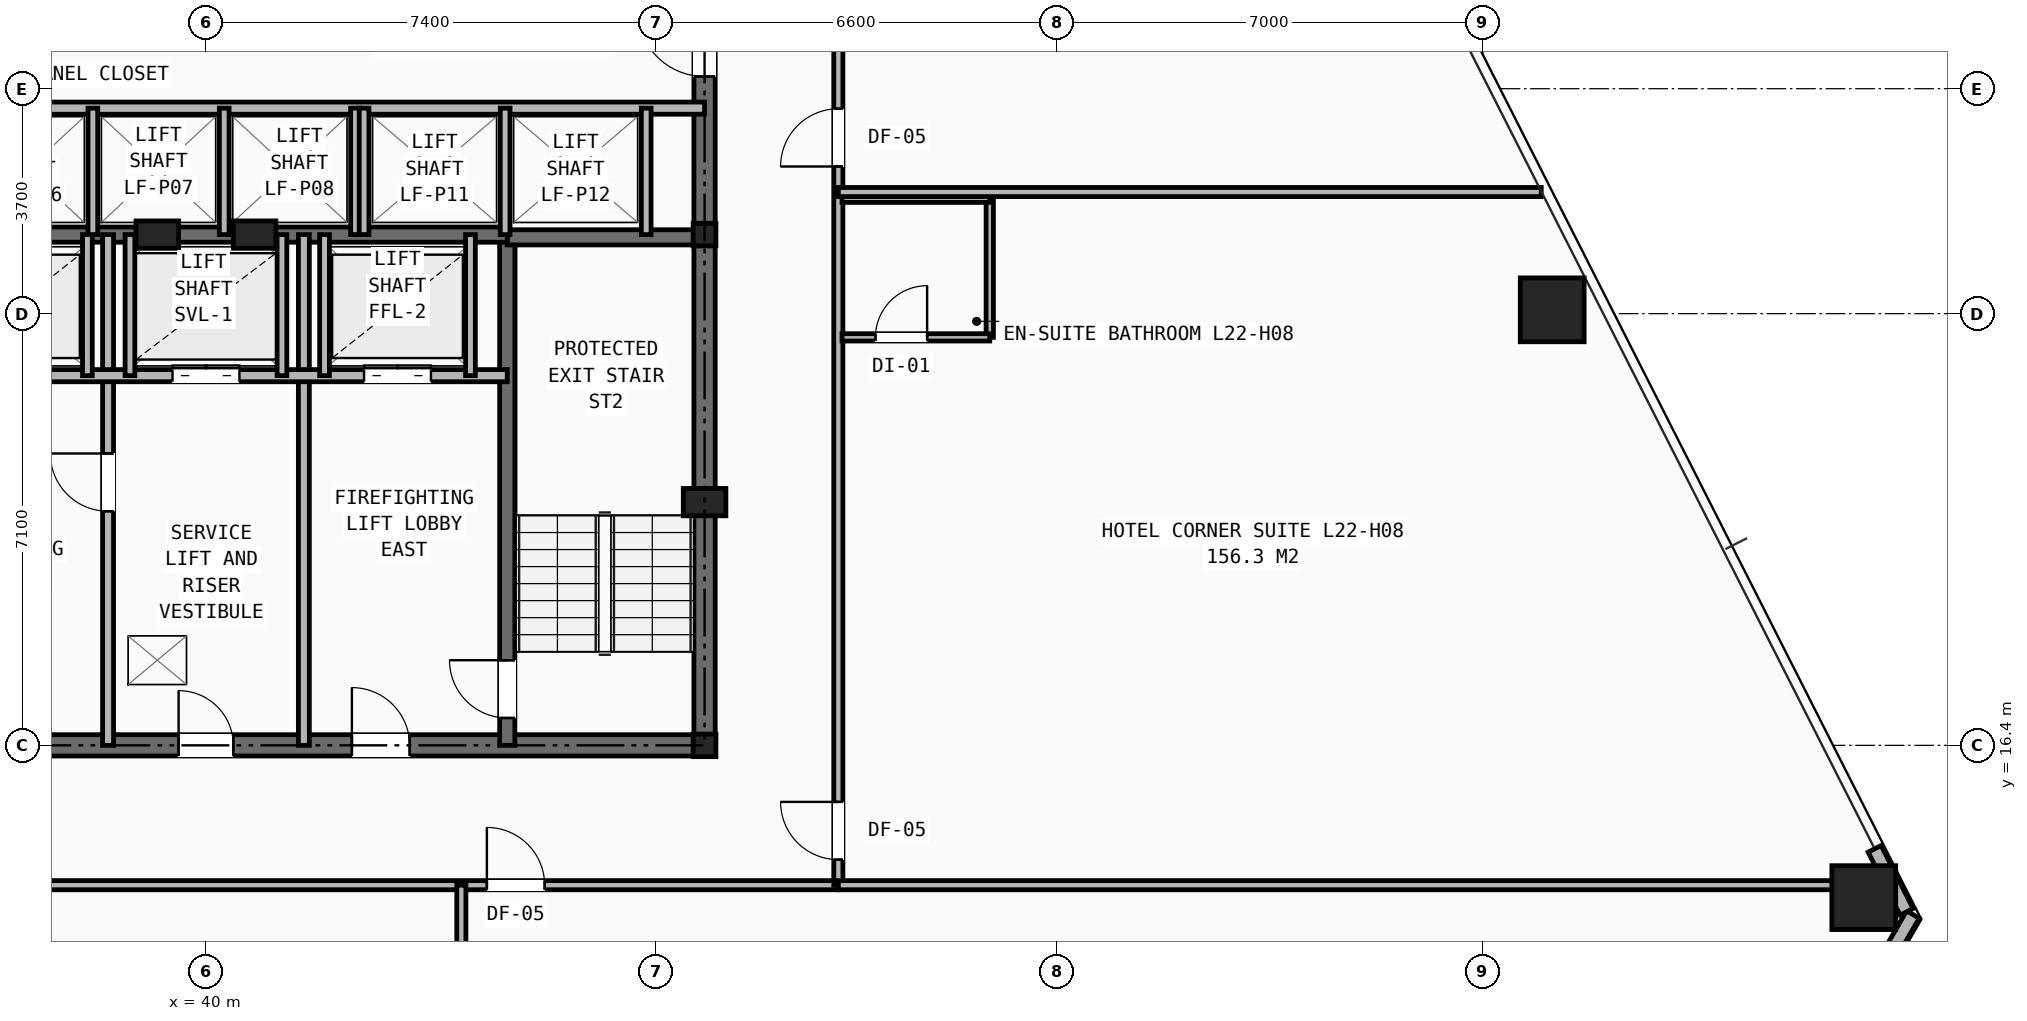
"""IFC4 building model, lengths in metres.
Left out: names, types, materials, properties, quantities, classifications, styles, units other than length and angle.
Written with IfcOpenShell. Run it as: python <this file> out.ifc"""

import sys

from ifc_helpers import new_model, si_unit, direction, frame, frame_2d, origin, origin_2d, place, context, subcontext, project, spatial, rectangle, hollow_rectangle, i_section, extrude, element, fill, save


model = new_model("IFC4")
c1 = context("Model", 3, precision=1e-05, world=origin(), true_north=direction((0.0, 1.0)))
c2 = subcontext(c1, "Body", "Model", "MODEL_VIEW")
j1 = project(units=[si_unit("LENGTHUNIT", "METRE"), si_unit("PLANEANGLEUNIT", "RADIAN")], contexts=[c1])
p1 = place(None, origin())
s1 = spatial("IfcSite", under=j1, at=p1, CompositionType="ELEMENT")
p2 = place(p1, origin())
s2 = spatial("IfcBuilding", under=s1, at=p2, CompositionType="ELEMENT")
p3 = place(p2, frame((0.0, 0.0, 79.8)))
s3 = spatial("IfcBuildingStorey", under=s2, at=p3, CompositionType="ELEMENT", Elevation=79.8)
for number, where, z_axis, x_axis in (
    (1, (48.2, 16.4, 0.0), (0.0, 0.0, 1.0), (1.0, 0.0, 0.0)),
    (2, (48.2, 24.8, 0.0), (0.0, 0.0, 1.0), (1.0, 0.0, 0.0)),
):
    element("IfcColumn", number, at=place(p3, frame(where, z_axis=z_axis, x_axis=x_axis)), inside=s3, PredefinedType="COLUMN", context=c2, shape_type="SweptSolid", body=[
        extrude(i_section(OverallWidth=0.374, OverallDepth=0.372, WebThickness=0.016, FlangeThickness=0.026, at=origin_2d()), origin(), (0.0, 0.0, 1.0), 3.2),
    ])
for number, where, z_axis, x_axis in (
    (3, (48.2, 20.4, 0.0), (0.0, 0.0, 1.0), (1.0, 0.0, 0.0)),
    (4, (39.2, 24.8, 0.0), (0.0, 0.0, 1.0), (1.0, 0.0, 0.0)),
    (5, (40.8, 24.8, 0.0), (0.0, 0.0, 1.0), (1.0, 0.0, 0.0)),
):
    element("IfcColumn", number, at=place(p3, frame(where, z_axis=z_axis, x_axis=x_axis)), inside=s3, PredefinedType="PILASTER", context=c2, shape_type="SweptSolid", body=[
        extrude(rectangle(XDim=0.7, YDim=0.45, at=origin_2d()), origin(), (0.0, 0.0, 1.0), 3.2),
    ])
for number, where, z_axis, x_axis in (
    (6, (67.264, 13.896, 0.0), (0.0, 0.0, 1.0), (1.0, 0.0, 0.0)),
    (7, (62.14, 23.563, 0.0), (0.0, 0.0, 1.0), (1.0, 0.0, 0.0)),
):
    element("IfcColumn", number, at=place(p3, frame(where, z_axis=z_axis, x_axis=x_axis)), inside=s3, PredefinedType="COLUMN", context=c2, shape_type="SweptSolid", body=[
        extrude(hollow_rectangle(XDim=1.05, YDim=1.05, WallThickness=0.07, at=origin_2d()), origin(), (0.0, 0.0, 1.0), 3.2),
    ])
p4 = place(p3, frame((68.072, 13.618, 0.0), z_axis=(0.0, 0.0, 1.0), x_axis=(-0.499984915177, -0.866034112836, 0.0)))
e8 = element("IfcWall", 8, at=p4, inside=s3, PredefinedType="SHEAR", context=c2, shape_type="SweptSolid", body=[
    extrude(rectangle(XDim=9.743, YDim=0.24, at=frame_2d((4.872, 0.0))), origin(), (0.0, 0.0, 1.0), 2.253),
])
p5 = place(p3, frame((67.969, 13.661, 0.0), z_axis=(0.0, 0.0, 1.0), x_axis=(-0.452163091908, 0.891935276977, 0.0)))
e9 = element("IfcWall", 9, at=p5, inside=s3, PredefinedType="SHEAR", context=c2, shape_type="SweptSolid", body=[
    extrude(rectangle(XDim=1.163, YDim=0.24, at=frame_2d((0.581, 0.0))), origin(), (0.0, 0.0, 1.0), 2.253),
])
p6 = place(p3, frame((31.8, 16.4, 0.0), z_axis=(0.0, 0.0, 1.0), x_axis=(1.0, 0.0, 0.0)))
e10 = element("IfcWall", 10, at=p6, inside=s3, PredefinedType="SHEAR", context=c2, shape_type="SweptSolid", body=[
    extrude(rectangle(XDim=16.4, YDim=0.35, at=frame_2d((8.2, 0.0))), origin(), (0.0, 0.0, 1.0), 2.97),
])
p7 = place(p6, frame((7.75, 0.0, 0.0)))
e11 = element("IfcOpeningElement", 11, at=p7, cuts=e10, PredefinedType="OPENING", context=c2, shape_type="SweptSolid", body=[
    extrude(rectangle(XDim=0.9, YDim=2.1, at=frame_2d((0.45, 1.05))), frame((0.0, 0.185, 0.0), z_axis=(0.0, -1.0, 0.0), x_axis=(1.0, 0.0, 0.0)), (0.0, 0.0, 1.0), 0.37),
])
p8 = place(p6, frame((4.2, 0.0, 0.0)))
e12 = element("IfcOpeningElement", 12, at=p8, cuts=e10, PredefinedType="OPENING", context=c2, shape_type="SweptSolid", body=[
    extrude(rectangle(XDim=0.95, YDim=2.1, at=frame_2d((0.475, 1.05))), frame((0.0, 0.185, 0.0), z_axis=(0.0, -1.0, 0.0), x_axis=(1.0, 0.0, 0.0)), (0.0, 0.0, 1.0), 0.37),
])
p9 = place(p6, frame((10.6, 0.0, 0.0)))
e13 = element("IfcOpeningElement", 13, at=p9, cuts=e10, PredefinedType="OPENING", context=c2, shape_type="SweptSolid", body=[
    extrude(rectangle(XDim=0.95, YDim=2.1, at=frame_2d((0.475, 1.05))), frame((0.0, 0.185, 0.0), z_axis=(0.0, -1.0, 0.0), x_axis=(1.0, 0.0, 0.0)), (0.0, 0.0, 1.0), 0.37),
])
p10 = place(p3, frame((48.2, 16.4, 0.0), z_axis=(0.0, 0.0, 1.0), x_axis=(0.0, 1.0, 0.0)))
e14 = element("IfcWall", 14, at=p10, inside=s3, PredefinedType="SHEAR", context=c2, shape_type="SweptSolid", body=[
    extrude(rectangle(XDim=14.8, YDim=0.35, at=frame_2d((7.4, 0.0))), origin(), (0.0, 0.0, 1.0), 2.97),
])
p11 = place(p10, frame((11.0, 0.0, 0.0)))
e15 = element("IfcOpeningElement", 15, at=p11, cuts=e14, PredefinedType="OPENING", context=c2, shape_type="SweptSolid", body=[
    extrude(rectangle(XDim=1.1, YDim=2.15, at=frame_2d((0.55, 1.075))), frame((0.0, 0.185, 0.0), z_axis=(0.0, -1.0, 0.0), x_axis=(1.0, 0.0, 0.0)), (0.0, 0.0, 1.0), 0.37),
])
p12 = place(p3, frame((44.955, 16.4, 0.0), z_axis=(0.0, 0.0, 1.0), x_axis=(0.0, 1.0, 0.0)))
e16 = element("IfcWall", 16, at=p12, inside=s3, PredefinedType="SHEAR", context=c2, shape_type="SweptSolid", body=[
    extrude(rectangle(XDim=8.4, YDim=0.25, at=frame_2d((4.2, 0.0))), origin(), (0.0, 0.0, 1.0), 2.97),
])
p13 = place(p12, frame((0.45, 0.0, 0.0)))
e17 = element("IfcOpeningElement", 17, at=p13, cuts=e16, PredefinedType="OPENING", context=c2, shape_type="SweptSolid", body=[
    extrude(rectangle(XDim=0.95, YDim=2.1, at=frame_2d((0.475, 1.05))), frame((0.0, 0.135, 0.0), z_axis=(0.0, -1.0, 0.0), x_axis=(1.0, 0.0, 0.0)), (0.0, 0.0, 1.0), 0.27),
])
p14 = place(p3, frame((44.955, 24.755, 0.0), z_axis=(0.0, 0.0, 1.0), x_axis=(1.0, 0.0, 0.0)))
e18 = element("IfcWall", 18, at=p14, inside=s3, PredefinedType="SHEAR", context=c2, shape_type="SweptSolid", body=[
    extrude(rectangle(XDim=3.245, YDim=0.25, at=frame_2d((1.623, 0.0))), origin(), (0.0, 0.0, 1.0), 2.97),
])
p15 = place(p3, frame((35.045, 24.8, 0.0), z_axis=(0.0, 0.0, 1.0), x_axis=(1.0, 0.0, 0.0)))
e19 = element("IfcWall", 19, at=p15, inside=s3, PredefinedType="SHEAR", context=c2, shape_type="SweptSolid", body=[
    extrude(rectangle(XDim=9.91, YDim=0.25, at=frame_2d((4.955, 0.0))), origin(), (0.0, 0.0, 1.0), 2.97),
])
p16 = place(p3, frame((38.39, 16.4, 0.0), z_axis=(0.0, 0.0, 1.0), x_axis=(0.0, 1.0, 0.0)))
e20 = element("IfcWall", 20, at=p16, inside=s3, PredefinedType="PARTITIONING", context=c2, shape_type="SweptSolid", body=[
    extrude(rectangle(XDim=8.4, YDim=0.18, at=frame_2d((4.2, 0.0))), origin(), (0.0, 0.0, 1.0), 2.421),
])
p17 = place(p16, frame((3.85, 0.0, 0.0)))
e21 = element("IfcOpeningElement", 21, at=p17, cuts=e20, PredefinedType="OPENING", context=c2, shape_type="SweptSolid", body=[
    extrude(rectangle(XDim=0.95, YDim=2.1, at=frame_2d((0.475, 1.05))), frame((0.0, 0.1, 0.0), z_axis=(0.0, -1.0, 0.0), x_axis=(1.0, 0.0, 0.0)), (0.0, 0.0, 1.0), 0.2),
])
p18 = place(p3, frame((41.61, 16.4, 0.0), z_axis=(0.0, 0.0, 1.0), x_axis=(0.0, 1.0, 0.0)))
e22 = element("IfcWall", 22, at=p18, inside=s3, PredefinedType="PARTITIONING", context=c2, shape_type="SweptSolid", body=[
    extrude(rectangle(XDim=8.4, YDim=0.18, at=frame_2d((4.2, 0.0))), origin(), (0.0, 0.0, 1.0), 2.421),
])
p19 = place(p3, frame((35.045, 22.48, 0.0), z_axis=(0.0, 0.0, 1.0), x_axis=(1.0, 0.0, 0.0)))
e23 = element("IfcWall", 23, at=p19, inside=s3, PredefinedType="SOLIDWALL", context=c2, shape_type="SweptSolid", body=[
    extrude(rectangle(XDim=9.91, YDim=0.2, at=frame_2d((4.955, 0.0))), origin(), (0.0, 0.0, 1.0), 2.97),
])
p20 = place(p19, frame((1.255, 0.0, 0.0)))
e24 = element("IfcOpeningElement", 24, at=p20, cuts=e23, PredefinedType="OPENING", context=c2, shape_type="SweptSolid", body=[
    extrude(rectangle(XDim=1.1, YDim=2.15, at=frame_2d((0.55, 1.075))), frame((0.0, 0.11, 0.0), z_axis=(0.0, -1.0, 0.0), x_axis=(1.0, 0.0, 0.0)), (0.0, 0.0, 1.0), 0.22),
])
p21 = place(p19, frame((7.555, 0.0, 0.0)))
e25 = element("IfcOpeningElement", 25, at=p21, cuts=e23, PredefinedType="OPENING", context=c2, shape_type="SweptSolid", body=[
    extrude(rectangle(XDim=1.1, YDim=2.15, at=frame_2d((0.55, 1.075))), frame((0.0, 0.11, 0.0), z_axis=(0.0, -1.0, 0.0), x_axis=(1.0, 0.0, 0.0)), (0.0, 0.0, 1.0), 0.22),
])
p22 = place(p19, frame((4.405, 0.0, 0.0)))
e26 = element("IfcOpeningElement", 26, at=p22, cuts=e23, PredefinedType="OPENING", context=c2, shape_type="SweptSolid", body=[
    extrude(rectangle(XDim=1.1, YDim=2.15, at=frame_2d((0.55, 1.075))), frame((0.0, 0.11, 0.0), z_axis=(0.0, -1.0, 0.0), x_axis=(1.0, 0.0, 0.0)), (0.0, 0.0, 1.0), 0.22),
])
for number, where, z_axis, x_axis in (
    (27, (38.05, 22.48, 0.0), (0.0, 0.0, 1.0), (0.0, 1.0, 0.0)),
    (28, (41.95, 22.48, 0.0), (0.0, 0.0, 1.0), (0.0, 1.0, 0.0)),
    (29, (44.35, 22.48, 0.0), (0.0, 0.0, 1.0), (0.0, 1.0, 0.0)),
    (30, (38.75, 22.48, 0.0), (0.0, 0.0, 1.0), (0.0, 1.0, 0.0)),
    (31, (41.25, 22.48, 0.0), (0.0, 0.0, 1.0), (0.0, 1.0, 0.0)),
):
    element("IfcWall", number, at=place(p3, frame(where, z_axis=z_axis, x_axis=x_axis)), inside=s3, PredefinedType="SOLIDWALL", context=c2, shape_type="SweptSolid", body=[
        extrude(rectangle(XDim=2.32, YDim=0.16, at=frame_2d((1.16, 0.0))), origin(), (0.0, 0.0, 1.0), 2.97),
    ])
p23 = place(p3, frame((31.8, 26.88, 0.0), z_axis=(0.0, 0.0, 1.0), x_axis=(1.0, 0.0, 0.0)))
e32 = element("IfcWall", 32, at=p23, inside=s3, PredefinedType="SOLIDWALL", context=c2, shape_type="SweptSolid", body=[
    extrude(rectangle(XDim=16.4, YDim=0.2, at=frame_2d((8.2, 0.0))), origin(), (0.0, 0.0, 1.0), 2.421),
])
p24 = place(p23, frame((0.55, 0.0, 0.0)))
e33 = element("IfcOpeningElement", 33, at=p24, cuts=e32, PredefinedType="OPENING", context=c2, shape_type="SweptSolid", body=[
    extrude(rectangle(XDim=0.85, YDim=2.05, at=frame_2d((0.425, 1.025))), frame((0.0, 0.11, 0.0), z_axis=(0.0, -1.0, 0.0), x_axis=(1.0, 0.0, 0.0)), (0.0, 0.0, 1.0), 0.22),
])
for number, where, z_axis, x_axis in (
    (34, (38.14, 24.8, 0.0), (0.0, 0.0, 1.0), (0.0, 1.0, 0.0)),
    (35, (40.3, 24.8, 0.0), (0.0, 0.0, 1.0), (0.0, 1.0, 0.0)),
    (36, (42.46, 24.8, 0.0), (0.0, 0.0, 1.0), (0.0, 1.0, 0.0)),
    (37, (42.6, 24.8, 0.0), (0.0, 0.0, 1.0), (0.0, 1.0, 0.0)),
    (38, (44.92, 24.8, 0.0), (0.0, 0.0, 1.0), (0.0, 1.0, 0.0)),
    (39, (47.24, 24.8, 0.0), (0.0, 0.0, 1.0), (0.0, 1.0, 0.0)),
):
    element("IfcWall", number, at=place(p3, frame(where, z_axis=z_axis, x_axis=x_axis)), inside=s3, PredefinedType="SOLIDWALL", context=c2, shape_type="SweptSolid", body=[
        extrude(rectangle(XDim=2.08, YDim=0.16, at=frame_2d((1.04, 0.0))), origin(), (0.0, 0.0, 1.0), 2.97),
    ])
p25 = place(p3, frame((29.6, 14.1, 0.0), z_axis=(0.0, 0.0, 1.0), x_axis=(1.0, 0.0, 0.0)))
e40 = element("IfcWall", 40, at=p25, inside=s3, PredefinedType="PARTITIONING", context=c2, shape_type="SweptSolid", body=[
    extrude(rectangle(XDim=20.8, YDim=0.15, at=frame_2d((10.4, 0.0))), origin(), (0.0, 0.0, 1.0), 2.181),
])
p26 = place(p25, frame((0.57, 0.0, 0.0)))
e41 = element("IfcOpeningElement", 41, at=p26, cuts=e40, PredefinedType="OPENING", context=c2, shape_type="SweptSolid", body=[
    extrude(rectangle(XDim=0.95, YDim=2.1, at=frame_2d((0.475, 1.05))), frame((0.0, 0.085, 0.0), z_axis=(0.0, -1.0, 0.0), x_axis=(1.0, 0.0, 0.0)), (0.0, 0.0, 1.0), 0.17),
])
p27 = place(p25, frame((5.82, 0.0, 0.0)))
e42 = element("IfcOpeningElement", 42, at=p27, cuts=e40, PredefinedType="OPENING", context=c2, shape_type="SweptSolid", body=[
    extrude(rectangle(XDim=0.95, YDim=2.1, at=frame_2d((0.475, 1.05))), frame((0.0, 0.085, 0.0), z_axis=(0.0, -1.0, 0.0), x_axis=(1.0, 0.0, 0.0)), (0.0, 0.0, 1.0), 0.17),
])
p28 = place(p25, frame((15.02, 0.0, 0.0)))
e43 = element("IfcOpeningElement", 43, at=p28, cuts=e40, PredefinedType="OPENING", context=c2, shape_type="SweptSolid", body=[
    extrude(rectangle(XDim=0.95, YDim=2.1, at=frame_2d((0.475, 1.05))), frame((0.0, 0.085, 0.0), z_axis=(0.0, -1.0, 0.0), x_axis=(1.0, 0.0, 0.0)), (0.0, 0.0, 1.0), 0.17),
])
p29 = place(p3, frame((50.4, 14.1, 0.0), z_axis=(0.0, 0.0, 1.0), x_axis=(0.0, 1.0, 0.0)))
e44 = element("IfcWall", 44, at=p29, inside=s3, PredefinedType="PARTITIONING", context=c2, shape_type="SweptSolid", body=[
    extrude(rectangle(XDim=21.9, YDim=0.15, at=frame_2d((10.95, 0.0))), origin(), (0.0, 0.0, 1.0), 2.181),
])
p30 = place(p29, frame((0.42, 0.0, 0.0)))
e45 = element("IfcOpeningElement", 45, at=p30, cuts=e44, PredefinedType="OPENING", context=c2, shape_type="SweptSolid", body=[
    extrude(rectangle(XDim=0.95, YDim=2.1, at=frame_2d((0.475, 1.05))), frame((0.0, 0.085, 0.0), z_axis=(0.0, -1.0, 0.0), x_axis=(1.0, 0.0, 0.0)), (0.0, 0.0, 1.0), 0.17),
])
p31 = place(p29, frame((11.82, 0.0, 0.0)))
e46 = element("IfcOpeningElement", 46, at=p31, cuts=e44, PredefinedType="OPENING", context=c2, shape_type="SweptSolid", body=[
    extrude(rectangle(XDim=0.95, YDim=2.1, at=frame_2d((0.475, 1.05))), frame((0.0, 0.085, 0.0), z_axis=(0.0, -1.0, 0.0), x_axis=(1.0, 0.0, 0.0)), (0.0, 0.0, 1.0), 0.17),
])
p32 = place(p3, frame((44.2, 4.225, 0.0), z_axis=(0.0, 0.0, 1.0), x_axis=(0.0, 1.0, 0.0)))
e47 = element("IfcWall", 47, at=p32, inside=s3, PredefinedType="PARTITIONING", context=c2, shape_type="SweptSolid", body=[
    extrude(rectangle(XDim=9.875, YDim=0.15, at=frame_2d((4.938, 0.0))), origin(), (0.0, 0.0, 1.0), 2.258),
])
p33 = place(p3, frame((50.4, 14.1, 0.0), z_axis=(0.0, 0.0, 1.0), x_axis=(1.0, 0.0, 0.0)))
e48 = element("IfcWall", 48, at=p33, inside=s3, PredefinedType="PARTITIONING", context=c2, shape_type="SweptSolid", body=[
    extrude(rectangle(XDim=17.341, YDim=0.15, at=frame_2d((8.67, 0.0))), origin(), (0.0, 0.0, 1.0), 2.181),
])
p34 = place(p3, frame((52.89, 23.11, 0.0), z_axis=(0.0, 0.0, 1.0), x_axis=(0.0, 1.0, 0.0)))
e49 = element("IfcWall", 49, at=p34, inside=s3, PredefinedType="PARTITIONING", context=c2, shape_type="SweptSolid", body=[
    extrude(rectangle(XDim=2.28, YDim=0.12, at=frame_2d((1.14, 0.0))), origin(), (0.0, 0.0, 1.0), 2.97),
])
p35 = place(p3, frame((50.46, 23.11, 0.0), z_axis=(0.0, 0.0, 1.0), x_axis=(1.0, 0.0, 0.0)))
e50 = element("IfcWall", 50, at=p35, inside=s3, PredefinedType="PARTITIONING", context=c2, shape_type="SweptSolid", body=[
    extrude(rectangle(XDim=2.43, YDim=0.12, at=frame_2d((1.215, 0.0))), origin(), (0.0, 0.0, 1.0), 2.97),
])
p36 = place(p35, frame((0.55, 0.0, 0.0)))
e51 = element("IfcOpeningElement", 51, at=p36, cuts=e50, PredefinedType="OPENING", context=c2, shape_type="SweptSolid", body=[
    extrude(rectangle(XDim=0.85, YDim=2.05, at=frame_2d((0.425, 1.025))), frame((0.0, 0.07, 0.0), z_axis=(0.0, -1.0, 0.0), x_axis=(1.0, 0.0, 0.0)), (0.0, 0.0, 1.0), 0.14),
])
p37 = place(p3, frame((50.46, 25.39, 0.0), z_axis=(0.0, 0.0, 1.0), x_axis=(1.0, 0.0, 0.0)))
e52 = element("IfcWall", 52, at=p37, inside=s3, PredefinedType="PARTITIONING", context=c2, shape_type="SweptSolid", body=[
    extrude(rectangle(XDim=2.43, YDim=0.12, at=frame_2d((1.215, 0.0))), origin(), (0.0, 0.0, 1.0), 2.97),
])
p38 = place(p3, frame((50.4, 25.5, 0.0), z_axis=(0.0, 0.0, 1.0), x_axis=(1.0, 0.0, 0.0)))
e53 = element("IfcWall", 53, at=p38, inside=s3, PredefinedType="PARTITIONING", context=c2, shape_type="SweptSolid", body=[
    extrude(rectangle(XDim=11.56, YDim=0.15, at=frame_2d((5.78, 0.0))), origin(), (0.0, 0.0, 1.0), 2.258),
])
p39 = place(p7, origin())
e54 = element("IfcDoor", 54, at=p39, inside=s3, OperationType="SINGLE_SWING_LEFT", PredefinedType="DOOR", context=c2, shape_type="SweptSolid", body=[
    extrude(rectangle(XDim=0.9, YDim=2.1, at=frame_2d((0.45, 1.05))), frame((0.0, 0.025, 0.0), z_axis=(0.0, -1.0, 0.0), x_axis=(1.0, 0.0, 0.0)), (0.0, 0.0, 1.0), 0.05),
])
fill(e11, e54)
p40 = place(p17, origin())
e55 = element("IfcDoor", 55, at=p40, inside=s3, OperationType="SINGLE_SWING_RIGHT", PredefinedType="DOOR", context=c2, shape_type="SweptSolid", body=[
    extrude(rectangle(XDim=0.95, YDim=2.1, at=frame_2d((0.475, 1.05))), frame((0.0, 0.025, 0.0), z_axis=(0.0, -1.0, 0.0), x_axis=(1.0, 0.0, 0.0)), (0.0, 0.0, 1.0), 0.05),
])
fill(e21, e55)
p41 = place(p13, origin())
e56 = element("IfcDoor", 56, at=p41, inside=s3, OperationType="SINGLE_SWING_RIGHT", PredefinedType="DOOR", context=c2, shape_type="SweptSolid", body=[
    extrude(rectangle(XDim=0.95, YDim=2.1, at=frame_2d((0.475, 1.05))), frame((0.0, 0.025, 0.0), z_axis=(0.0, -1.0, 0.0), x_axis=(1.0, 0.0, 0.0)), (0.0, 0.0, 1.0), 0.05),
])
fill(e17, e56)
p42 = place(p9, origin())
e57 = element("IfcDoor", 57, at=p42, inside=s3, OperationType="SINGLE_SWING_LEFT", PredefinedType="DOOR", context=c2, shape_type="SweptSolid", body=[
    extrude(rectangle(XDim=0.95, YDim=2.1, at=frame_2d((0.475, 1.05))), frame((0.0, 0.025, 0.0), z_axis=(0.0, -1.0, 0.0), x_axis=(1.0, 0.0, 0.0)), (0.0, 0.0, 1.0), 0.05),
])
fill(e13, e57)
p43 = place(p21, origin())
e58 = element("IfcDoor", 58, at=p43, inside=s3, OperationType="DOUBLE_DOOR_SLIDING", PredefinedType="DOOR", context=c2, shape_type="SweptSolid", body=[
    extrude(rectangle(XDim=1.1, YDim=2.15, at=frame_2d((0.55, 1.075))), frame((0.0, 0.025, 0.0), z_axis=(0.0, -1.0, 0.0), x_axis=(1.0, 0.0, 0.0)), (0.0, 0.0, 1.0), 0.05),
])
fill(e25, e58)
p44 = place(p22, origin())
e59 = element("IfcDoor", 59, at=p44, inside=s3, OperationType="DOUBLE_DOOR_SLIDING", PredefinedType="DOOR", context=c2, shape_type="SweptSolid", body=[
    extrude(rectangle(XDim=1.1, YDim=2.15, at=frame_2d((0.55, 1.075))), frame((0.0, 0.025, 0.0), z_axis=(0.0, -1.0, 0.0), x_axis=(1.0, 0.0, 0.0)), (0.0, 0.0, 1.0), 0.05),
])
fill(e26, e59)
p45 = place(p11, origin())
e60 = element("IfcDoor", 60, at=p45, inside=s3, OperationType="SINGLE_SWING_RIGHT", PredefinedType="DOOR", context=c2, shape_type="SweptSolid", body=[
    extrude(rectangle(XDim=1.1, YDim=2.15, at=frame_2d((0.55, 1.075))), frame((0.0, 0.025, 0.0), z_axis=(0.0, -1.0, 0.0), x_axis=(1.0, 0.0, 0.0)), (0.0, 0.0, 1.0), 0.05),
])
fill(e15, e60)
p46 = place(p28, origin())
e61 = element("IfcDoor", 61, at=p46, inside=s3, OperationType="SINGLE_SWING_LEFT", PredefinedType="DOOR", context=c2, shape_type="SweptSolid", body=[
    extrude(rectangle(XDim=0.95, YDim=2.1, at=frame_2d((0.475, 1.05))), frame((0.0, 0.025, 0.0), z_axis=(0.0, -1.0, 0.0), x_axis=(1.0, 0.0, 0.0)), (0.0, 0.0, 1.0), 0.05),
])
fill(e43, e61)
p47 = place(p30, origin())
e62 = element("IfcDoor", 62, at=p47, inside=s3, OperationType="SINGLE_SWING_RIGHT", PredefinedType="DOOR", context=c2, shape_type="SweptSolid", body=[
    extrude(rectangle(XDim=0.95, YDim=2.1, at=frame_2d((0.475, 1.05))), frame((0.0, 0.025, 0.0), z_axis=(0.0, -1.0, 0.0), x_axis=(1.0, 0.0, 0.0)), (0.0, 0.0, 1.0), 0.05),
])
fill(e45, e62)
p48 = place(p36, origin())
e63 = element("IfcDoor", 63, at=p48, inside=s3, OperationType="SINGLE_SWING_RIGHT", PredefinedType="DOOR", context=c2, shape_type="SweptSolid", body=[
    extrude(rectangle(XDim=0.85, YDim=2.05, at=frame_2d((0.425, 1.025))), frame((0.0, 0.025, 0.0), z_axis=(0.0, -1.0, 0.0), x_axis=(1.0, 0.0, 0.0)), (0.0, 0.0, 1.0), 0.05),
])
fill(e51, e63)
p49 = place(p31, origin())
e64 = element("IfcDoor", 64, at=p49, inside=s3, OperationType="SINGLE_SWING_LEFT", PredefinedType="DOOR", context=c2, shape_type="SweptSolid", body=[
    extrude(rectangle(XDim=0.95, YDim=2.1, at=frame_2d((0.475, 1.05))), frame((0.0, 0.025, 0.0), z_axis=(0.0, -1.0, 0.0), x_axis=(1.0, 0.0, 0.0)), (0.0, 0.0, 1.0), 0.05),
])
fill(e46, e64)
save(model, sys.argv[1])
